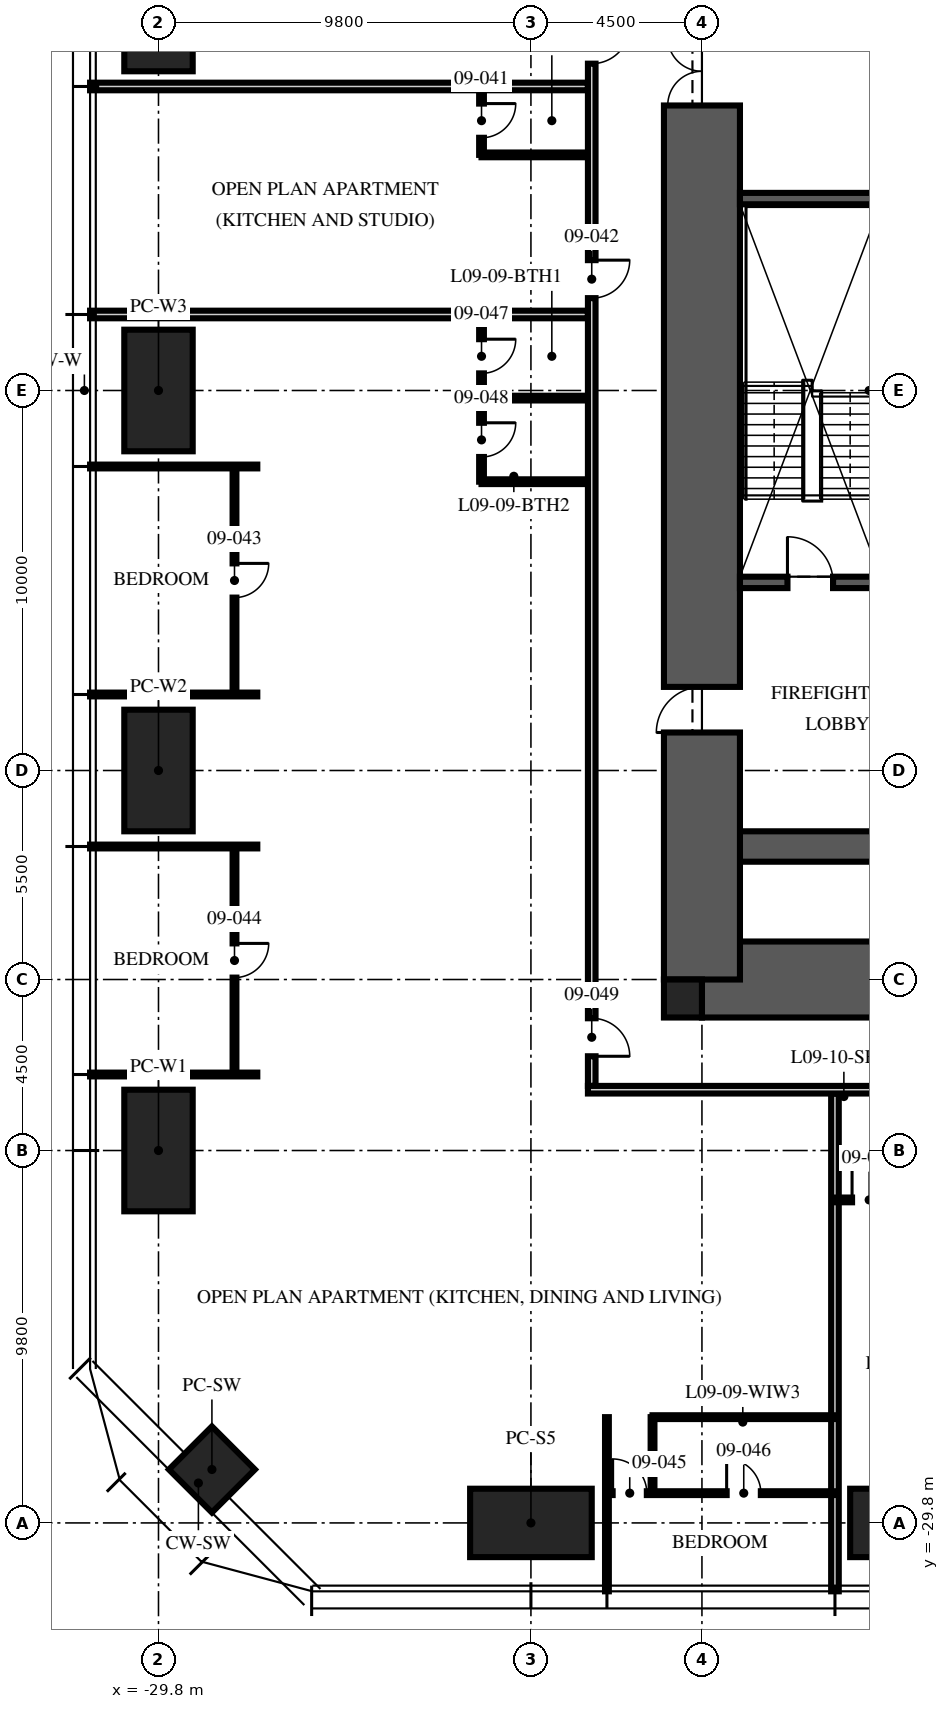
"""IFC4 building model, lengths in metres.
Left out: names, types, materials, properties, quantities, classifications, styles, units other than length and angle.
Written with IfcOpenShell. Run it as: python <this file> out.ifc"""

import sys

from ifc_helpers import new_model, si_unit, direction, frame, frame_2d, origin, origin_2d, place, context, subcontext, project, spatial, rectangle, hollow_rectangle, extrude, element, fill, save


model = new_model("IFC4")
c1 = context("Model", 3, precision=1e-05, world=origin(), true_north=direction((0.0, 1.0)))
c2 = subcontext(c1, "Body", "Model", "MODEL_VIEW")
j1 = project(units=[si_unit("LENGTHUNIT", "METRE"), si_unit("PLANEANGLEUNIT", "RADIAN")], contexts=[c1])
p1 = place(None, origin())
s1 = spatial("IfcSite", under=j1, at=p1, CompositionType="ELEMENT")
p2 = place(p1, origin())
s2 = spatial("IfcBuilding", under=s1, at=p2, CompositionType="ELEMENT")
p3 = place(p2, frame((0.0, 0.0, 39.75)))
s3 = spatial("IfcBuildingStorey", under=s2, at=p3, CompositionType="ELEMENT", Elevation=39.75)
p4 = place(p3, frame((-15.5, -15.5, -0.25), z_axis=(0.0, 0.0, 1.0), x_axis=(1.0, 0.0, 0.0)))
e1 = element("IfcWall", 1, at=p4, inside=s3, PredefinedType="SHEAR", context=c2, shape_type="SweptSolid", body=[
    extrude(rectangle(XDim=31.0, YDim=2.0, at=frame_2d((15.5, 0.0))), origin(), (0.0, 0.0, 1.0), 3.75),
])
p5 = place(p3, frame((-15.5, -12.0, -0.25), z_axis=(0.0, 0.0, 1.0), x_axis=(1.0, 0.0, 0.0)))
e2 = element("IfcWall", 2, at=p5, inside=s3, PredefinedType="SHEAR", context=c2, shape_type="SweptSolid", body=[
    extrude(rectangle(XDim=31.0, YDim=0.8, at=frame_2d((15.5, 0.0))), origin(), (0.0, 0.0, 1.0), 3.75),
])
p6 = place(p3, frame((-15.5, -15.5, -0.25), z_axis=(0.0, 0.0, 1.0), x_axis=(0.0, 1.0, 0.0)))
e3 = element("IfcWall", 3, at=p6, inside=s3, PredefinedType="SHEAR", context=c2, shape_type="SweptSolid", body=[
    extrude(rectangle(XDim=31.0, YDim=2.0, at=frame_2d((15.5, 0.0))), origin(), (0.0, 0.0, 1.0), 3.75),
])
p7 = place(p6, frame((6.5, 0.0, 0.25)))
e4 = element("IfcOpeningElement", 4, at=p7, cuts=e3, PredefinedType="OPENING", context=c2, shape_type="SweptSolid", body=[
    extrude(rectangle(XDim=1.2, YDim=2.1, at=frame_2d((0.6, 1.05))), frame((0.0, 1.01, 0.0), z_axis=(0.0, -1.0, 0.0), x_axis=(1.0, 0.0, 0.0)), (0.0, 0.0, 1.0), 2.02),
])
p8 = place(p6, frame((23.0, 0.0, 0.25)))
e5 = element("IfcOpeningElement", 5, at=p8, cuts=e3, PredefinedType="OPENING", context=c2, shape_type="SweptSolid", body=[
    extrude(rectangle(XDim=1.8, YDim=2.1, at=frame_2d((0.9, 1.05))), frame((0.0, 1.01, 0.0), z_axis=(0.0, -1.0, 0.0), x_axis=(1.0, 0.0, 0.0)), (0.0, 0.0, 1.0), 2.02),
])
p9 = place(p3, frame((-16.0, -16.0, -0.25), z_axis=(0.0, 0.0, 1.0), x_axis=(1.0, 0.0, 0.0)))
e6 = element("IfcColumn", 6, at=p9, inside=s3, PredefinedType="COLUMN", context=c2, shape_type="SweptSolid", body=[
    extrude(rectangle(XDim=1.0, YDim=1.0, at=origin_2d()), origin(), (0.0, 0.0, 1.0), 3.75),
])
for number, where, z_axis, x_axis in (
    (7, (-10.0, -29.8, 0.0), (0.0, 0.0, 1.0), (1.0, 0.0, 0.0)),
    (8, (-20.0, -29.8, 0.0), (0.0, 0.0, 1.0), (1.0, 0.0, 0.0)),
    (9, (-29.8, -20.0, 0.0), (0.0, 0.0, 1.0), (0.0, 1.0, 0.0)),
    (10, (-29.8, -10.0, 0.0), (0.0, 0.0, 1.0), (0.0, 1.0, 0.0)),
    (11, (-29.8, 0.0, 0.0), (0.0, 0.0, 1.0), (0.0, 1.0, 0.0)),
    (12, (-29.8, 10.0, 0.0), (0.0, 0.0, 1.0), (0.0, 1.0, 0.0)),
):
    element("IfcColumn", number, at=place(p3, frame(where, z_axis=z_axis, x_axis=x_axis)), inside=s3, PredefinedType="COLUMN", context=c2, shape_type="SweptSolid", body=[
        extrude(hollow_rectangle(XDim=3.2, YDim=1.8, WallThickness=0.2, at=origin_2d()), origin(), (0.0, 0.0, 1.0), 3.75),
    ])
p10 = place(p3, frame((-28.394, -28.394, 0.0), z_axis=(0.0, 0.0, 1.0), x_axis=(0.707106781187, -0.707106781187, 0.0)))
e13 = element("IfcColumn", 13, at=p10, inside=s3, PredefinedType="COLUMN", context=c2, shape_type="SweptSolid", body=[
    extrude(hollow_rectangle(XDim=1.6, YDim=1.6, WallThickness=0.1, at=origin_2d()), origin(), (0.0, 0.0, 1.0), 3.75),
])
p11 = place(p3, frame((-14.5, -5.05, 0.0), z_axis=(0.0, 0.0, 1.0), x_axis=(1.0, 0.0, 0.0)))
e14 = element("IfcWall", 14, at=p11, inside=s3, PredefinedType="SOLIDWALL", context=c2, shape_type="SweptSolid", body=[
    extrude(rectangle(XDim=5.7, YDim=0.3, at=frame_2d((2.85, 0.0))), origin(), (0.0, 0.0, 1.0), 3.5),
])
p12 = place(p11, frame((1.25, 0.0, 0.0)))
e15 = element("IfcOpeningElement", 15, at=p12, cuts=e14, PredefinedType="OPENING", context=c2, shape_type="SweptSolid", body=[
    extrude(rectangle(XDim=1.2, YDim=2.1, at=frame_2d((0.6, 1.05))), frame((0.0, 0.16, 0.0), z_axis=(0.0, -1.0, 0.0), x_axis=(1.0, 0.0, 0.0)), (0.0, 0.0, 1.0), 0.32),
])
p13 = place(p3, frame((-14.5, 5.05, 0.0), z_axis=(0.0, 0.0, 1.0), x_axis=(1.0, 0.0, 0.0)))
e16 = element("IfcWall", 16, at=p13, inside=s3, PredefinedType="SOLIDWALL", context=c2, shape_type="SweptSolid", body=[
    extrude(rectangle(XDim=3.7, YDim=0.3, at=frame_2d((1.85, 0.0))), origin(), (0.0, 0.0, 1.0), 3.5),
])
for number, where, z_axis, x_axis in (
    (17, (-18.5, 8.0, 0.0), (0.0, 0.0, 1.0), (-1.0, 0.0, 0.0)),
    (18, (-18.5, 2.0, 0.0), (0.0, 0.0, 1.0), (-1.0, 0.0, 0.0)),
):
    element("IfcWall", number, at=place(p3, frame(where, z_axis=z_axis, x_axis=x_axis)), inside=s3, PredefinedType="PARTITIONING", context=c2, shape_type="SweptSolid", body=[
        extrude(rectangle(XDim=13.1, YDim=0.2, at=frame_2d((6.55, 0.0))), origin(), (0.0, 0.0, 1.0), 2.71),
    ])
for number, where, z_axis, x_axis in (
    (19, (-27.2, -2.0, 0.0), (0.0, 0.0, 1.0), (-1.0, 0.0, 0.0)),
    (20, (-27.2, -8.0, 0.0), (0.0, 0.0, 1.0), (-1.0, 0.0, 0.0)),
    (21, (-27.2, -12.0, 0.0), (0.0, 0.0, 1.0), (-1.0, 0.0, 0.0)),
    (22, (-27.2, -18.0, 0.0), (0.0, 0.0, 1.0), (-1.0, 0.0, 0.0)),
):
    element("IfcWall", number, at=place(p3, frame(where, z_axis=z_axis, x_axis=x_axis)), inside=s3, PredefinedType="PARTITIONING", context=c2, shape_type="SweptSolid", body=[
        extrude(rectangle(XDim=4.4, YDim=0.1, at=frame_2d((2.2, 0.0))), origin(), (0.0, 0.0, 1.0), 2.71),
    ])
p14 = place(p3, frame((-18.0, -27.017, 0.0), z_axis=(0.0, 0.0, 1.0), x_axis=(0.0, -1.0, 0.0)))
e23 = element("IfcWall", 23, at=p14, inside=s3, PredefinedType="PARTITIONING", context=c2, shape_type="SweptSolid", body=[
    extrude(rectangle(XDim=4.583, YDim=0.1, at=frame_2d((2.292, 0.0))), origin(), (0.0, 0.0, 1.0), 2.71),
])
p15 = place(p3, frame((-12.0, -18.5, 0.0), z_axis=(0.0, 0.0, 1.0), x_axis=(0.0, -1.0, 0.0)))
e24 = element("IfcWall", 24, at=p15, inside=s3, PredefinedType="PARTITIONING", context=c2, shape_type="SweptSolid", body=[
    extrude(rectangle(XDim=13.1, YDim=0.2, at=frame_2d((6.55, 0.0))), origin(), (0.0, 0.0, 1.0), 2.71),
])
p16 = place(p3, frame((-21.3, 8.0, 0.0), z_axis=(0.0, 0.0, 1.0), x_axis=(0.0, -1.0, 0.0)))
e25 = element("IfcWall", 25, at=p16, inside=s3, PredefinedType="PARTITIONING", context=c2, shape_type="SweptSolid", body=[
    extrude(rectangle(XDim=1.8, YDim=0.125, at=frame_2d((0.9, 0.0))), origin(), (0.0, 0.0, 1.0), 3.5),
])
p17 = place(p16, frame((0.45, 0.0, 0.0)))
e26 = element("IfcOpeningElement", 26, at=p17, cuts=e25, PredefinedType="OPENING", context=c2, shape_type="SweptSolid", body=[
    extrude(rectangle(XDim=0.9, YDim=2.1, at=frame_2d((0.45, 1.05))), frame((0.0, 0.073, 0.0), z_axis=(0.0, -1.0, 0.0), x_axis=(1.0, 0.0, 0.0)), (0.0, 0.0, 1.0), 0.145),
])
p18 = place(p3, frame((-18.5, 6.2, 0.0), z_axis=(0.0, 0.0, 1.0), x_axis=(-1.0, 0.0, 0.0)))
e27 = element("IfcWall", 27, at=p18, inside=s3, PredefinedType="PARTITIONING", context=c2, shape_type="SweptSolid", body=[
    extrude(rectangle(XDim=2.8, YDim=0.125, at=frame_2d((1.4, 0.0))), origin(), (0.0, 0.0, 1.0), 3.5),
])
p19 = place(p3, frame((-27.8, -2.0, 0.0), z_axis=(0.0, 0.0, 1.0), x_axis=(0.0, -1.0, 0.0)))
e28 = element("IfcWall", 28, at=p19, inside=s3, PredefinedType="PARTITIONING", context=c2, shape_type="SweptSolid", body=[
    extrude(rectangle(XDim=6.0, YDim=0.1, at=frame_2d((3.0, 0.0))), origin(), (0.0, 0.0, 1.0), 2.61),
])
p20 = place(p19, frame((2.55, 0.0, 0.0)))
e29 = element("IfcOpeningElement", 29, at=p20, cuts=e28, PredefinedType="OPENING", context=c2, shape_type="SweptSolid", body=[
    extrude(rectangle(XDim=0.9, YDim=2.1, at=frame_2d((0.45, 1.05))), frame((0.0, 0.06, 0.0), z_axis=(0.0, -1.0, 0.0), x_axis=(1.0, 0.0, 0.0)), (0.0, 0.0, 1.0), 0.12),
])
p21 = place(p3, frame((-27.8, -12.0, 0.0), z_axis=(0.0, 0.0, 1.0), x_axis=(0.0, -1.0, 0.0)))
e30 = element("IfcWall", 30, at=p21, inside=s3, PredefinedType="PARTITIONING", context=c2, shape_type="SweptSolid", body=[
    extrude(rectangle(XDim=6.0, YDim=0.1, at=frame_2d((3.0, 0.0))), origin(), (0.0, 0.0, 1.0), 2.61),
])
p22 = place(p21, frame((2.55, 0.0, 0.0)))
e31 = element("IfcOpeningElement", 31, at=p22, cuts=e30, PredefinedType="OPENING", context=c2, shape_type="SweptSolid", body=[
    extrude(rectangle(XDim=0.9, YDim=2.1, at=frame_2d((0.45, 1.05))), frame((0.0, 0.06, 0.0), z_axis=(0.0, -1.0, 0.0), x_axis=(1.0, 0.0, 0.0)), (0.0, 0.0, 1.0), 0.12),
])
p23 = place(p3, frame((-18.0, -29.017, 0.0), z_axis=(0.0, 0.0, 1.0), x_axis=(1.0, 0.0, 0.0)))
e32 = element("IfcWall", 32, at=p23, inside=s3, PredefinedType="PARTITIONING", context=c2, shape_type="SweptSolid", body=[
    extrude(rectangle(XDim=6.0, YDim=0.1, at=frame_2d((3.0, 0.0))), origin(), (0.0, 0.0, 1.0), 2.61),
])
p24 = place(p23, frame((0.15, 0.0, 0.0)))
e33 = element("IfcOpeningElement", 33, at=p24, cuts=e32, PredefinedType="OPENING", context=c2, shape_type="SweptSolid", body=[
    extrude(rectangle(XDim=0.9, YDim=2.1, at=frame_2d((0.45, 1.05))), frame((0.0, 0.06, 0.0), z_axis=(0.0, -1.0, 0.0), x_axis=(1.0, 0.0, 0.0)), (0.0, 0.0, 1.0), 0.12),
])
p25 = place(p23, frame((3.15, 0.0, 0.0)))
e34 = element("IfcOpeningElement", 34, at=p25, cuts=e32, PredefinedType="OPENING", context=c2, shape_type="SweptSolid", body=[
    extrude(rectangle(XDim=0.9, YDim=2.1, at=frame_2d((0.45, 1.05))), frame((0.0, 0.06, 0.0), z_axis=(0.0, -1.0, 0.0), x_axis=(1.0, 0.0, 0.0)), (0.0, 0.0, 1.0), 0.12),
])
p26 = place(p3, frame((-16.8, -27.017, 0.0), z_axis=(0.0, 0.0, 1.0), x_axis=(0.0, -1.0, 0.0)))
e35 = element("IfcWall", 35, at=p26, inside=s3, PredefinedType="PARTITIONING", context=c2, shape_type="SweptSolid", body=[
    extrude(rectangle(XDim=2.0, YDim=0.1, at=frame_2d((1.0, 0.0))), origin(), (0.0, 0.0, 1.0), 3.5),
])
p27 = place(p3, frame((-16.8, -27.017, 0.0), z_axis=(0.0, 0.0, 1.0), x_axis=(1.0, 0.0, 0.0)))
e36 = element("IfcWall", 36, at=p27, inside=s3, PredefinedType="PARTITIONING", context=c2, shape_type="SweptSolid", body=[
    extrude(rectangle(XDim=4.8, YDim=0.1, at=frame_2d((2.4, 0.0))), origin(), (0.0, 0.0, 1.0), 2.61),
])
p28 = place(p3, frame((-21.3, 2.0, 0.0), z_axis=(0.0, 0.0, 1.0), x_axis=(0.0, -1.0, 0.0)))
e37 = element("IfcWall", 37, at=p28, inside=s3, PredefinedType="PARTITIONING", context=c2, shape_type="SweptSolid", body=[
    extrude(rectangle(XDim=4.4, YDim=0.125, at=frame_2d((2.2, 0.0))), origin(), (0.0, 0.0, 1.0), 2.492),
])
p29 = place(p28, frame((0.65, 0.0, 0.0)))
e38 = element("IfcOpeningElement", 38, at=p29, cuts=e37, PredefinedType="OPENING", context=c2, shape_type="SweptSolid", body=[
    extrude(rectangle(XDim=0.9, YDim=2.1, at=frame_2d((0.45, 1.05))), frame((0.0, 0.073, 0.0), z_axis=(0.0, -1.0, 0.0), x_axis=(1.0, 0.0, 0.0)), (0.0, 0.0, 1.0), 0.145),
])
p30 = place(p28, frame((2.85, 0.0, 0.0)))
e39 = element("IfcOpeningElement", 39, at=p30, cuts=e37, PredefinedType="OPENING", context=c2, shape_type="SweptSolid", body=[
    extrude(rectangle(XDim=0.9, YDim=2.1, at=frame_2d((0.45, 1.05))), frame((0.0, 0.073, 0.0), z_axis=(0.0, -1.0, 0.0), x_axis=(1.0, 0.0, 0.0)), (0.0, 0.0, 1.0), 0.145),
])
p31 = place(p3, frame((-18.5, -0.2, 0.0), z_axis=(0.0, 0.0, 1.0), x_axis=(-1.0, 0.0, 0.0)))
e40 = element("IfcWall", 40, at=p31, inside=s3, PredefinedType="PARTITIONING", context=c2, shape_type="SweptSolid", body=[
    extrude(rectangle(XDim=2.8, YDim=0.125, at=frame_2d((1.4, 0.0))), origin(), (0.0, 0.0, 1.0), 2.492),
])
p32 = place(p3, frame((-18.5, -2.4, 0.0), z_axis=(0.0, 0.0, 1.0), x_axis=(-1.0, 0.0, 0.0)))
e41 = element("IfcWall", 41, at=p32, inside=s3, PredefinedType="PARTITIONING", context=c2, shape_type="SweptSolid", body=[
    extrude(rectangle(XDim=2.8, YDim=0.125, at=frame_2d((1.4, 0.0))), origin(), (0.0, 0.0, 1.0), 3.5),
])
p33 = place(p3, frame((-12.0, -21.3, 0.0), z_axis=(0.0, 0.0, 1.0), x_axis=(1.0, 0.0, 0.0)))
e42 = element("IfcWall", 42, at=p33, inside=s3, PredefinedType="PARTITIONING", context=c2, shape_type="SweptSolid", body=[
    extrude(rectangle(XDim=1.8, YDim=0.125, at=frame_2d((0.9, 0.0))), origin(), (0.0, 0.0, 1.0), 3.5),
])
p34 = place(p33, frame((0.45, 0.0, 0.0)))
e43 = element("IfcOpeningElement", 43, at=p34, cuts=e42, PredefinedType="OPENING", context=c2, shape_type="SweptSolid", body=[
    extrude(rectangle(XDim=0.9, YDim=2.1, at=frame_2d((0.45, 1.05))), frame((0.0, 0.073, 0.0), z_axis=(0.0, -1.0, 0.0), x_axis=(1.0, 0.0, 0.0)), (0.0, 0.0, 1.0), 0.145),
])
p35 = place(p3, frame((-18.4, 18.3, 0.0), z_axis=(0.0, 0.0, 1.0), x_axis=(0.0, -1.0, 0.0)))
e44 = element("IfcWall", 44, at=p35, inside=s3, PredefinedType="PARTITIONING", context=c2, shape_type="SweptSolid", body=[
    extrude(rectangle(XDim=36.6, YDim=0.2, at=frame_2d((18.3, 0.0))), origin(), (0.0, 0.0, 1.0), 2.3),
])
p36 = place(p35, frame((8.7, 0.0, 0.0)))
e45 = element("IfcOpeningElement", 45, at=p36, cuts=e44, PredefinedType="OPENING", context=c2, shape_type="SweptSolid", body=[
    extrude(rectangle(XDim=1.0, YDim=2.2, at=frame_2d((0.5, 1.1))), frame((0.0, 0.11, 0.0), z_axis=(0.0, -1.0, 0.0), x_axis=(1.0, 0.0, 0.0)), (0.0, 0.0, 1.0), 0.22),
])
p37 = place(p35, frame((14.87, 0.0, 0.0)))
e46 = element("IfcOpeningElement", 46, at=p37, cuts=e44, PredefinedType="OPENING", context=c2, shape_type="SweptSolid", body=[
    extrude(rectangle(XDim=1.0, YDim=2.2, at=frame_2d((0.5, 1.1))), frame((0.0, 0.11, 0.0), z_axis=(0.0, -1.0, 0.0), x_axis=(1.0, 0.0, 0.0)), (0.0, 0.0, 1.0), 0.22),
])
p38 = place(p35, frame((34.82, 0.0, 0.0)))
e47 = element("IfcOpeningElement", 47, at=p38, cuts=e44, PredefinedType="OPENING", context=c2, shape_type="SweptSolid", body=[
    extrude(rectangle(XDim=1.0, YDim=2.2, at=frame_2d((0.5, 1.1))), frame((0.0, 0.11, 0.0), z_axis=(0.0, -1.0, 0.0), x_axis=(1.0, 0.0, 0.0)), (0.0, 0.0, 1.0), 0.22),
])
p39 = place(p3, frame((18.5, -18.4, 0.0), z_axis=(0.0, 0.0, 1.0), x_axis=(-1.0, 0.0, 0.0)))
e48 = element("IfcWall", 48, at=p39, inside=s3, PredefinedType="PARTITIONING", context=c2, shape_type="SweptSolid", body=[
    extrude(rectangle(XDim=37.0, YDim=0.2, at=frame_2d((18.5, 0.0))), origin(), (0.0, 0.0, 1.0), 2.3),
])
p40 = place(p39, frame((26.93, 0.0, 0.0)))
e49 = element("IfcOpeningElement", 49, at=p40, cuts=e48, PredefinedType="OPENING", context=c2, shape_type="SweptSolid", body=[
    extrude(rectangle(XDim=1.0, YDim=2.2, at=frame_2d((0.5, 1.1))), frame((0.0, 0.11, 0.0), z_axis=(0.0, -1.0, 0.0), x_axis=(1.0, 0.0, 0.0)), (0.0, 0.0, 1.0), 0.22),
])
p41 = place(p39, frame((0.98, 0.0, 0.0)))
e50 = element("IfcOpeningElement", 50, at=p41, cuts=e48, PredefinedType="OPENING", context=c2, shape_type="SweptSolid", body=[
    extrude(rectangle(XDim=1.0, YDim=2.2, at=frame_2d((0.5, 1.1))), frame((0.0, 0.11, 0.0), z_axis=(0.0, -1.0, 0.0), x_axis=(1.0, 0.0, 0.0)), (0.0, 0.0, 1.0), 0.22),
])
p42 = place(p12, origin())
e51 = element("IfcDoor", 51, at=p42, inside=s3, OperationType="SINGLE_SWING_LEFT", PredefinedType="DOOR", context=c2, shape_type="SweptSolid", body=[
    extrude(rectangle(XDim=1.2, YDim=2.1, at=frame_2d((0.6, 1.05))), frame((0.0, 0.025, 0.0), z_axis=(0.0, -1.0, 0.0), x_axis=(1.0, 0.0, 0.0)), (0.0, 0.0, 1.0), 0.05),
])
fill(e15, e51)
p43 = place(p7, origin())
e52 = element("IfcDoor", 52, at=p43, inside=s3, OperationType="SINGLE_SWING_LEFT", PredefinedType="DOOR", context=c2, shape_type="SweptSolid", body=[
    extrude(rectangle(XDim=1.2, YDim=2.1, at=frame_2d((0.6, 1.05))), frame((0.0, 0.025, 0.0), z_axis=(0.0, -1.0, 0.0), x_axis=(1.0, 0.0, 0.0)), (0.0, 0.0, 1.0), 0.05),
])
fill(e4, e52)
p44 = place(p8, origin())
e53 = element("IfcDoor", 53, at=p44, inside=s3, OperationType="DOUBLE_DOOR_SINGLE_SWING", PredefinedType="DOOR", context=c2, shape_type="SweptSolid", body=[
    extrude(rectangle(XDim=1.8, YDim=2.1, at=frame_2d((0.9, 1.05))), frame((0.0, 0.025, 0.0), z_axis=(0.0, -1.0, 0.0), x_axis=(1.0, 0.0, 0.0)), (0.0, 0.0, 1.0), 0.05),
])
fill(e5, e53)
p45 = place(p36, origin())
e54 = element("IfcDoor", 54, at=p45, inside=s3, OperationType="SINGLE_SWING_LEFT", PredefinedType="DOOR", context=c2, shape_type="SweptSolid", body=[
    extrude(rectangle(XDim=1.0, YDim=2.2, at=frame_2d((0.5, 1.1))), frame((0.0, 0.025, 0.0), z_axis=(0.0, -1.0, 0.0), x_axis=(1.0, 0.0, 0.0)), (0.0, 0.0, 1.0), 0.05),
])
fill(e45, e54)
p46 = place(p17, origin())
e55 = element("IfcDoor", 55, at=p46, inside=s3, OperationType="SINGLE_SWING_LEFT", PredefinedType="DOOR", context=c2, shape_type="SweptSolid", body=[
    extrude(rectangle(XDim=0.9, YDim=2.1, at=frame_2d((0.45, 1.05))), frame((0.0, 0.025, 0.0), z_axis=(0.0, -1.0, 0.0), x_axis=(1.0, 0.0, 0.0)), (0.0, 0.0, 1.0), 0.05),
])
fill(e26, e55)
p47 = place(p37, origin())
e56 = element("IfcDoor", 56, at=p47, inside=s3, OperationType="SINGLE_SWING_LEFT", PredefinedType="DOOR", context=c2, shape_type="SweptSolid", body=[
    extrude(rectangle(XDim=1.0, YDim=2.2, at=frame_2d((0.5, 1.1))), frame((0.0, 0.025, 0.0), z_axis=(0.0, -1.0, 0.0), x_axis=(1.0, 0.0, 0.0)), (0.0, 0.0, 1.0), 0.05),
])
fill(e46, e56)
p48 = place(p20, origin())
e57 = element("IfcDoor", 57, at=p48, inside=s3, OperationType="SINGLE_SWING_LEFT", PredefinedType="DOOR", context=c2, shape_type="SweptSolid", body=[
    extrude(rectangle(XDim=0.9, YDim=2.1, at=frame_2d((0.45, 1.05))), frame((0.0, 0.025, 0.0), z_axis=(0.0, -1.0, 0.0), x_axis=(1.0, 0.0, 0.0)), (0.0, 0.0, 1.0), 0.05),
])
fill(e29, e57)
p49 = place(p22, origin())
e58 = element("IfcDoor", 58, at=p49, inside=s3, OperationType="SINGLE_SWING_LEFT", PredefinedType="DOOR", context=c2, shape_type="SweptSolid", body=[
    extrude(rectangle(XDim=0.9, YDim=2.1, at=frame_2d((0.45, 1.05))), frame((0.0, 0.025, 0.0), z_axis=(0.0, -1.0, 0.0), x_axis=(1.0, 0.0, 0.0)), (0.0, 0.0, 1.0), 0.05),
])
fill(e31, e58)
p50 = place(p24, origin())
e59 = element("IfcDoor", 59, at=p50, inside=s3, OperationType="SINGLE_SWING_LEFT", PredefinedType="DOOR", context=c2, shape_type="SweptSolid", body=[
    extrude(rectangle(XDim=0.9, YDim=2.1, at=frame_2d((0.45, 1.05))), frame((0.0, 0.025, 0.0), z_axis=(0.0, -1.0, 0.0), x_axis=(1.0, 0.0, 0.0)), (0.0, 0.0, 1.0), 0.05),
])
fill(e33, e59)
p51 = place(p25, origin())
e60 = element("IfcDoor", 60, at=p51, inside=s3, OperationType="SINGLE_SWING_LEFT", PredefinedType="DOOR", context=c2, shape_type="SweptSolid", body=[
    extrude(rectangle(XDim=0.9, YDim=2.1, at=frame_2d((0.45, 1.05))), frame((0.0, 0.025, 0.0), z_axis=(0.0, -1.0, 0.0), x_axis=(1.0, 0.0, 0.0)), (0.0, 0.0, 1.0), 0.05),
])
fill(e34, e60)
p52 = place(p29, origin())
e61 = element("IfcDoor", 61, at=p52, inside=s3, OperationType="SINGLE_SWING_LEFT", PredefinedType="DOOR", context=c2, shape_type="SweptSolid", body=[
    extrude(rectangle(XDim=0.9, YDim=2.1, at=frame_2d((0.45, 1.05))), frame((0.0, 0.025, 0.0), z_axis=(0.0, -1.0, 0.0), x_axis=(1.0, 0.0, 0.0)), (0.0, 0.0, 1.0), 0.05),
])
fill(e38, e61)
p53 = place(p30, origin())
e62 = element("IfcDoor", 62, at=p53, inside=s3, OperationType="SINGLE_SWING_LEFT", PredefinedType="DOOR", context=c2, shape_type="SweptSolid", body=[
    extrude(rectangle(XDim=0.9, YDim=2.1, at=frame_2d((0.45, 1.05))), frame((0.0, 0.025, 0.0), z_axis=(0.0, -1.0, 0.0), x_axis=(1.0, 0.0, 0.0)), (0.0, 0.0, 1.0), 0.05),
])
fill(e39, e62)
p54 = place(p38, origin())
e63 = element("IfcDoor", 63, at=p54, inside=s3, OperationType="SINGLE_SWING_RIGHT", PredefinedType="DOOR", context=c2, shape_type="SweptSolid", body=[
    extrude(rectangle(XDim=1.0, YDim=2.2, at=frame_2d((0.5, 1.1))), frame((0.0, 0.025, 0.0), z_axis=(0.0, -1.0, 0.0), x_axis=(1.0, 0.0, 0.0)), (0.0, 0.0, 1.0), 0.05),
])
fill(e47, e63)
p55 = place(p34, origin())
e64 = element("IfcDoor", 64, at=p55, inside=s3, OperationType="SINGLE_SWING_LEFT", PredefinedType="DOOR", context=c2, shape_type="SweptSolid", body=[
    extrude(rectangle(XDim=0.9, YDim=2.1, at=frame_2d((0.45, 1.05))), frame((0.0, 0.025, 0.0), z_axis=(0.0, -1.0, 0.0), x_axis=(1.0, 0.0, 0.0)), (0.0, 0.0, 1.0), 0.05),
])
fill(e43, e64)
save(model, sys.argv[1])
